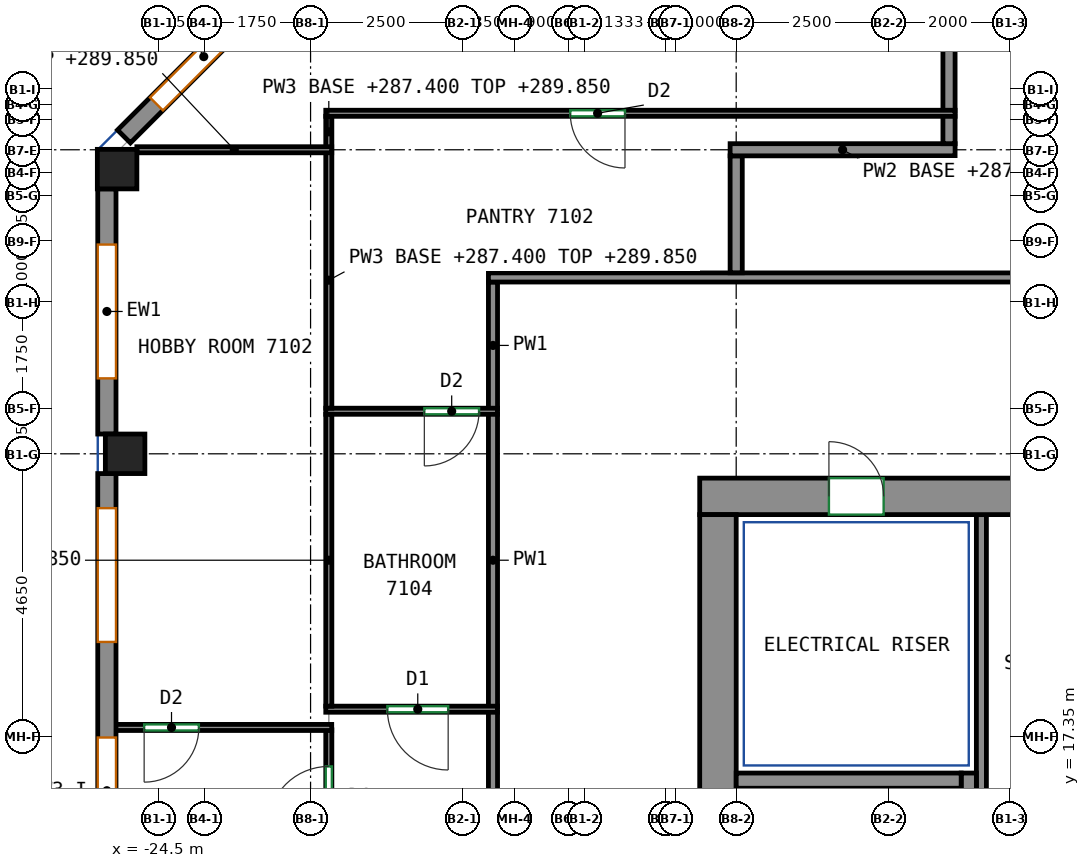
"""IFC4 building model, lengths in metres.
Left out: names, types, materials, properties, quantities, classifications, styles, units other than length and angle.
Written with IfcOpenShell. Run it as: python <this file> out.ifc"""

import sys

from ifc_helpers import new_model, si_unit, direction, frame, frame_2d, origin, origin_2d, place, context, subcontext, project, spatial, rectangle, extrude, source, transform, mapped, element, fill, save


model = new_model("IFC4")
c1 = context("Model", 3, precision=1e-05, world=origin(), true_north=direction((0.0, 1.0)))
c2 = subcontext(c1, "Body", "Model", "MODEL_VIEW")
j1 = project(units=[si_unit("LENGTHUNIT", "METRE"), si_unit("PLANEANGLEUNIT", "RADIAN")], contexts=[c1])
p1 = place(None, origin())
s1 = spatial("IfcSite", under=j1, at=p1, CompositionType="ELEMENT")
p2 = place(p1, origin())
s2 = spatial("IfcBuilding", under=s1, at=p2, CompositionType="ELEMENT")
p3 = place(p2, frame((0.0, 0.0, 287.4)))
s3 = spatial("IfcBuildingStorey", under=s2, at=p3, CompositionType="ELEMENT", Elevation=287.4)
m1 = source(origin(), c2, "Body", "SweptSolid", [
    extrude(rectangle(XDim=0.65, YDim=0.65, at=origin_2d()), origin(), (0.0, 0.0, 1.0), 3.0),
])
for number, where, z_axis, x_axis in (
    (1, (-25.182, 26.682, 0.0), (0.0, 0.0, 1.0), (1.0, 0.0, 0.0)),
    (2, (-25.05, 22.0, 0.0), (0.0, 0.0, 1.0), (1.0, 0.0, 0.0)),
):
    element("IfcColumn", number, at=place(p3, frame(where, z_axis=z_axis, x_axis=x_axis)), inside=s3, PredefinedType="COLUMN", context=c2, shape_type="MappedRepresentation", body=[
        mapped(m1, transform((0.0, 0.0, 0.0))),
    ])
m2 = source(origin(), c2, "Body", "SweptSolid", [
    extrude(rectangle(XDim=33.3, YDim=0.6, at=frame_2d((16.65, 0.0))), origin(), (0.0, 0.0, 1.0), 3.0),
])
p4 = place(p3, frame((-15.6, 21.3, 0.0), z_axis=(0.0, 0.0, 1.0), x_axis=(1.0, 0.0, 0.0)))
e3 = element("IfcWall", 3, at=p4, inside=s3, PredefinedType="SHEAR", context=c2, shape_type="MappedRepresentation", body=[
    mapped(m2, transform((0.0, 0.0, 0.0))),
])
p5 = place(p4, frame((5.708, 0.0, 0.0)))
e4 = element("IfcOpeningElement", 4, at=p5, cuts=e3, PredefinedType="OPENING", context=c2, shape_type="SweptSolid", body=[
    extrude(rectangle(XDim=0.9, YDim=2.1, at=frame_2d((0.45, 1.05))), frame((0.0, 0.31, 0.0), z_axis=(0.0, -1.0, 0.0), x_axis=(1.0, 0.0, 0.0)), (0.0, 0.0, 1.0), 0.62),
])
p6 = place(p4, frame((10.773, 0.0, 0.0)))
e5 = element("IfcOpeningElement", 5, at=p6, cuts=e3, PredefinedType="OPENING", context=c2, shape_type="SweptSolid", body=[
    extrude(rectangle(XDim=0.9, YDim=2.1, at=frame_2d((0.45, 1.05))), frame((0.0, 0.31, 0.0), z_axis=(0.0, -1.0, 0.0), x_axis=(1.0, 0.0, 0.0)), (0.0, 0.0, 1.0), 0.62),
])
p7 = place(p4, frame((15.838, 0.0, 0.0)))
e6 = element("IfcOpeningElement", 6, at=p7, cuts=e3, PredefinedType="OPENING", context=c2, shape_type="SweptSolid", body=[
    extrude(rectangle(XDim=0.9, YDim=2.1, at=frame_2d((0.45, 1.05))), frame((0.0, 0.31, 0.0), z_axis=(0.0, -1.0, 0.0), x_axis=(1.0, 0.0, 0.0)), (0.0, 0.0, 1.0), 0.62),
])
p8 = place(p4, frame((21.493, 0.0, 0.0)))
e7 = element("IfcOpeningElement", 7, at=p8, cuts=e3, PredefinedType="OPENING", context=c2, shape_type="SweptSolid", body=[
    extrude(rectangle(XDim=0.9, YDim=2.1, at=frame_2d((0.45, 1.05))), frame((0.0, 0.31, 0.0), z_axis=(0.0, -1.0, 0.0), x_axis=(1.0, 0.0, 0.0)), (0.0, 0.0, 1.0), 0.62),
])
p9 = place(p4, frame((26.92, 0.0, 0.0)))
e8 = element("IfcOpeningElement", 8, at=p9, cuts=e3, PredefinedType="OPENING", context=c2, shape_type="SweptSolid", body=[
    extrude(rectangle(XDim=0.9, YDim=2.1, at=frame_2d((0.45, 1.05))), frame((0.0, 0.31, 0.0), z_axis=(0.0, -1.0, 0.0), x_axis=(1.0, 0.0, 0.0)), (0.0, 0.0, 1.0), 0.62),
])
p10 = place(p4, frame((2.125, 0.0, 0.0)))
e9 = element("IfcOpeningElement", 9, at=p10, cuts=e3, PredefinedType="OPENING", context=c2, shape_type="SweptSolid", body=[
    extrude(rectangle(XDim=0.9, YDim=2.1, at=frame_2d((0.45, 1.05))), frame((0.0, 0.31, 0.0), z_axis=(0.0, -1.0, 0.0), x_axis=(1.0, 0.0, 0.0)), (0.0, 0.0, 1.0), 0.62),
])
p11 = place(p4, frame((30.275, 0.0, 0.0)))
e10 = element("IfcOpeningElement", 10, at=p11, cuts=e3, PredefinedType="OPENING", context=c2, shape_type="SweptSolid", body=[
    extrude(rectangle(XDim=0.9, YDim=2.1, at=frame_2d((0.45, 1.05))), frame((0.0, 0.31, 0.0), z_axis=(0.0, -1.0, 0.0), x_axis=(1.0, 0.0, 0.0)), (0.0, 0.0, 1.0), 0.62),
])
m3 = source(origin(), c2, "Body", "SweptSolid", [
    extrude(rectangle(XDim=12.0, YDim=0.6, at=frame_2d((6.0, 0.0))), origin(), (0.0, 0.0, 1.0), 3.0),
])
p12 = place(p3, frame((-15.3, 9.0, 0.0), z_axis=(0.0, 0.0, 1.0), x_axis=(0.0, 1.0, 0.0)))
e11 = element("IfcWall", 11, at=p12, inside=s3, PredefinedType="SHEAR", context=c2, shape_type="MappedRepresentation", body=[
    mapped(m3, transform((0.0, 0.0, 0.0))),
])
m4 = source(origin(), c2, "Body", "SweptSolid", [
    extrude(rectangle(XDim=7.75, YDim=0.25, at=frame_2d((3.875, 0.0))), origin(), (0.0, 0.0, 1.0), 3.0),
])
p13 = place(p3, frame((-11.175, 9.0, 0.0), z_axis=(0.0, 0.0, 1.0), x_axis=(0.0, 1.0, 0.0)))
e12 = element("IfcWall", 12, at=p13, inside=s3, PredefinedType="SHEAR", context=c2, shape_type="MappedRepresentation", body=[
    mapped(m4, transform((0.0, 0.0, 0.0))),
])
m5 = source(origin(), c2, "Body", "SweptSolid", [
    extrude(rectangle(XDim=3.7, YDim=0.25, at=frame_2d((1.85, 0.0))), origin(), (0.0, 0.0, 1.0), 3.0),
])
p14 = place(p3, frame((-15.0, 16.625, 0.0), z_axis=(0.0, 0.0, 1.0), x_axis=(1.0, 0.0, 0.0)))
e13 = element("IfcWall", 13, at=p14, inside=s3, PredefinedType="SHEAR", context=c2, shape_type="MappedRepresentation", body=[
    mapped(m5, transform((0.0, 0.0, 0.0))),
])
m6 = source(origin(), c2, "Body", "SweptSolid", [
    extrude(rectangle(XDim=3.712, YDim=0.3, at=frame_2d((1.856, 0.0))), origin(), (0.0, 0.0, 1.0), 3.0),
])
p15 = place(p3, frame((-22.444, 29.844, 0.0), z_axis=(0.0, 0.0, 1.0), x_axis=(-0.707106781187, -0.707106781187, 0.0)))
e14 = element("IfcWall", 14, at=p15, inside=s3, PredefinedType="SOLIDWALL", context=c2, shape_type="MappedRepresentation", body=[
    mapped(m6, transform((0.0, 0.0, 0.0))),
])
p16 = place(p15, frame((0.756, 0.0, 0.8)))
e15 = element("IfcOpeningElement", 15, at=p16, cuts=e14, PredefinedType="OPENING", context=c2, shape_type="SweptSolid", body=[
    extrude(rectangle(XDim=2.2, YDim=2.05, at=frame_2d((1.1, 1.025))), frame((0.0, 0.16, 0.0), z_axis=(0.0, -1.0, 0.0), x_axis=(1.0, 0.0, 0.0)), (0.0, 0.0, 1.0), 0.32),
])
m7 = source(origin(), c2, "Body", "SweptSolid", [
    extrude(rectangle(XDim=4.032, YDim=0.3, at=frame_2d((2.016, 0.0))), origin(), (0.0, 0.0, 1.0), 3.0),
])
p17 = place(p3, frame((-25.35, 26.357, 0.0), z_axis=(0.0, 0.0, 1.0), x_axis=(0.0, -1.0, 0.0)))
e16 = element("IfcWall", 16, at=p17, inside=s3, PredefinedType="SOLIDWALL", context=c2, shape_type="MappedRepresentation", body=[
    mapped(m7, transform((0.0, 0.0, 0.0))),
])
p18 = place(p17, frame((0.916, 0.0, 0.8)))
e17 = element("IfcOpeningElement", 17, at=p18, cuts=e16, PredefinedType="OPENING", context=c2, shape_type="SweptSolid", body=[
    extrude(rectangle(XDim=2.2, YDim=2.05, at=frame_2d((1.1, 1.025))), frame((0.0, 0.16, 0.0), z_axis=(0.0, -1.0, 0.0), x_axis=(1.0, 0.0, 0.0)), (0.0, 0.0, 1.0), 0.32),
])
m8 = source(origin(), c2, "Body", "SweptSolid", [
    extrude(rectangle(XDim=13.35, YDim=0.3, at=frame_2d((6.675, 0.0))), origin(), (0.0, 0.0, 1.0), 3.0),
])
p19 = place(p3, frame((-25.35, 21.675, 0.0), z_axis=(0.0, 0.0, 1.0), x_axis=(0.0, -1.0, 0.0)))
e18 = element("IfcWall", 18, at=p19, inside=s3, PredefinedType="SOLIDWALL", context=c2, shape_type="MappedRepresentation", body=[
    mapped(m8, transform((0.0, 0.0, 0.0))),
])
p20 = place(p19, frame((0.569, 0.0, 0.8)))
e19 = element("IfcOpeningElement", 19, at=p20, cuts=e18, PredefinedType="OPENING", context=c2, shape_type="SweptSolid", body=[
    extrude(rectangle(XDim=2.2, YDim=2.05, at=frame_2d((1.1, 1.025))), frame((0.0, 0.16, 0.0), z_axis=(0.0, -1.0, 0.0), x_axis=(1.0, 0.0, 0.0)), (0.0, 0.0, 1.0), 0.32),
])
p21 = place(p19, frame((4.341, 0.0, 0.8)))
e20 = element("IfcOpeningElement", 20, at=p21, cuts=e18, PredefinedType="OPENING", context=c2, shape_type="SweptSolid", body=[
    extrude(rectangle(XDim=1.75, YDim=2.05, at=frame_2d((0.875, 1.025))), frame((0.0, 0.16, 0.0), z_axis=(0.0, -1.0, 0.0), x_axis=(1.0, 0.0, 0.0)), (0.0, 0.0, 1.0), 0.32),
])
p22 = place(p19, frame((7.244, 0.0, 0.8)))
e21 = element("IfcOpeningElement", 21, at=p22, cuts=e18, PredefinedType="OPENING", context=c2, shape_type="SweptSolid", body=[
    extrude(rectangle(XDim=2.2, YDim=2.05, at=frame_2d((1.1, 1.025))), frame((0.0, 0.16, 0.0), z_axis=(0.0, -1.0, 0.0), x_axis=(1.0, 0.0, 0.0)), (0.0, 0.0, 1.0), 0.32),
])
p23 = place(p19, frame((10.581, 0.0, 0.8)))
e22 = element("IfcOpeningElement", 22, at=p23, cuts=e18, PredefinedType="OPENING", context=c2, shape_type="SweptSolid", body=[
    extrude(rectangle(XDim=2.2, YDim=2.05, at=frame_2d((1.1, 1.025))), frame((0.0, 0.16, 0.0), z_axis=(0.0, -1.0, 0.0), x_axis=(1.0, 0.0, 0.0)), (0.0, 0.0, 1.0), 0.32),
])
m9 = source(origin(), c2, "Body", "SweptSolid", [
    extrude(rectangle(XDim=4.8, YDim=0.165, at=frame_2d((2.4, 0.0))), origin(), (0.0, 0.0, 1.0), 3.0),
])
p24 = place(p3, frame((-10.968, 16.2, 0.0), z_axis=(0.0, 0.0, 1.0), x_axis=(0.0, 1.0, 0.0)))
e23 = element("IfcWall", 23, at=p24, inside=s3, PredefinedType="PARTITIONING", context=c2, shape_type="MappedRepresentation", body=[
    mapped(m9, transform((0.0, 0.0, 0.0))),
])
p25 = place(p3, frame((-19.0, 12.94, 0.0), z_axis=(0.0, 0.0, 1.0), x_axis=(0.0, 1.0, 0.0)))
e24 = element("IfcWall", 24, at=p25, inside=s3, PredefinedType="PARTITIONING", context=c2, shape_type="SweptSolid", body=[
    extrude(rectangle(XDim=4.82, YDim=0.15, at=frame_2d((2.41, 0.0))), origin(), (0.0, 0.0, 1.0), 3.0),
])
p26 = place(p25, frame((1.407, 0.0, 0.0)))
e25 = element("IfcOpeningElement", 25, at=p26, cuts=e24, PredefinedType="OPENING", context=c2, shape_type="SweptSolid", body=[
    extrude(rectangle(XDim=1.0, YDim=2.1, at=frame_2d((0.5, 1.05))), frame((0.0, 0.085, 0.0), z_axis=(0.0, -1.0, 0.0), x_axis=(1.0, 0.0, 0.0)), (0.0, 0.0, 1.0), 0.17),
])
p27 = place(p3, frame((-19.0, 17.84, 0.0), z_axis=(0.0, 0.0, 1.0), x_axis=(0.0, 1.0, 0.0)))
e26 = element("IfcWall", 26, at=p27, inside=s3, PredefinedType="PARTITIONING", context=c2, shape_type="SweptSolid", body=[
    extrude(rectangle(XDim=4.82, YDim=0.15, at=frame_2d((2.41, 0.0))), origin(), (0.0, 0.0, 1.0), 3.0),
])
p28 = place(p3, frame((-19.0, 22.74, 0.0), z_axis=(0.0, 0.0, 1.0), x_axis=(0.0, 1.0, 0.0)))
e27 = element("IfcWall", 27, at=p28, inside=s3, PredefinedType="PARTITIONING", context=c2, shape_type="SweptSolid", body=[
    extrude(rectangle(XDim=2.085, YDim=0.15, at=frame_2d((1.042, 0.0))), origin(), (0.0, 0.0, 1.0), 3.0),
])
p29 = place(p3, frame((-19.075, 24.9, 0.0), z_axis=(0.0, 0.0, 1.0), x_axis=(1.0, 0.0, 0.0)))
e28 = element("IfcWall", 28, at=p29, inside=s3, PredefinedType="PARTITIONING", context=c2, shape_type="SweptSolid", body=[
    extrude(rectangle(XDim=39.75, YDim=0.15, at=frame_2d((19.875, 0.0))), origin(), (0.0, 0.0, 1.0), 3.0),
])
p30 = place(p29, frame((10.77, 0.0, 0.0)))
e29 = element("IfcOpeningElement", 29, at=p30, cuts=e28, PredefinedType="OPENING", context=c2, shape_type="SweptSolid", body=[
    extrude(rectangle(XDim=0.9, YDim=2.1, at=frame_2d((0.45, 1.05))), frame((0.0, 0.085, 0.0), z_axis=(0.0, -1.0, 0.0), x_axis=(1.0, 0.0, 0.0)), (0.0, 0.0, 1.0), 0.17),
])
p31 = place(p29, frame((32.395, 0.0, 0.0)))
e30 = element("IfcOpeningElement", 30, at=p31, cuts=e28, PredefinedType="OPENING", context=c2, shape_type="SweptSolid", body=[
    extrude(rectangle(XDim=1.0, YDim=2.1, at=frame_2d((0.5, 1.05))), frame((0.0, 0.085, 0.0), z_axis=(0.0, -1.0, 0.0), x_axis=(1.0, 0.0, 0.0)), (0.0, 0.0, 1.0), 0.17),
])
p32 = place(p3, frame((-15.0, 26.9, 0.0), z_axis=(0.0, 0.0, 1.0), x_axis=(0.0, -1.0, 0.0)))
e31 = element("IfcWall", 31, at=p32, inside=s3, PredefinedType="PARTITIONING", context=c2, shape_type="SweptSolid", body=[
    extrude(rectangle(XDim=1.923, YDim=0.2, at=frame_2d((0.961, 0.0))), origin(), (0.0, 0.0, 1.0), 3.0),
])
p33 = place(p3, frame((-11.4, 27.0, 0.0), z_axis=(0.0, 0.0, 1.0), x_axis=(-1.0, 0.0, 0.0)))
e32 = element("IfcWall", 32, at=p33, inside=s3, PredefinedType="PARTITIONING", context=c2, shape_type="SweptSolid", body=[
    extrude(rectangle(XDim=3.7, YDim=0.2, at=frame_2d((1.85, 0.0))), origin(), (0.0, 0.0, 1.0), 2.45),
])
p34 = place(p3, frame((-11.5, 27.1, 0.0), z_axis=(0.0, 0.0, 1.0), x_axis=(0.0, 1.0, 0.0)))
e33 = element("IfcWall", 33, at=p34, inside=s3, PredefinedType="PARTITIONING", context=c2, shape_type="SweptSolid", body=[
    extrude(rectangle(XDim=0.46, YDim=0.2, at=frame_2d((0.23, 0.0))), origin(), (0.0, 0.0, 1.0), 3.0),
])
p35 = place(p3, frame((-11.5, 27.642, 0.0), z_axis=(0.0, 0.0, 1.0), x_axis=(0.0, 1.0, 0.0)))
e34 = element("IfcWall", 34, at=p35, inside=s3, PredefinedType="PARTITIONING", context=c2, shape_type="SweptSolid", body=[
    extrude(rectangle(XDim=2.608, YDim=0.2, at=frame_2d((1.304, 0.0))), origin(), (0.0, 0.0, 1.0), 3.0),
])
p36 = place(p3, frame((-18.927, 17.8, 0.0), z_axis=(0.0, 0.0, 1.0), x_axis=(-1.0, 0.0, 0.0)))
e35 = element("IfcWall", 35, at=p36, inside=s3, PredefinedType="PARTITIONING", context=c2, shape_type="SweptSolid", body=[
    extrude(rectangle(XDim=2.823, YDim=0.1, at=frame_2d((1.412, 0.0))), origin(), (0.0, 0.0, 1.0), 3.0),
])
p37 = place(p36, frame((0.81, 0.0, 0.0)))
e36 = element("IfcOpeningElement", 36, at=p37, cuts=e35, PredefinedType="OPENING", context=c2, shape_type="SweptSolid", body=[
    extrude(rectangle(XDim=1.0, YDim=2.1, at=frame_2d((0.5, 1.05))), frame((0.0, 0.06, 0.0), z_axis=(0.0, -1.0, 0.0), x_axis=(1.0, 0.0, 0.0)), (0.0, 0.0, 1.0), 0.12),
])
p38 = place(p3, frame((-21.7, 12.95, 0.0), z_axis=(0.0, 0.0, 1.0), x_axis=(0.0, 1.0, 0.0)))
e37 = element("IfcWall", 37, at=p38, inside=s3, PredefinedType="PARTITIONING", context=c2, shape_type="SweptSolid", body=[
    extrude(rectangle(XDim=4.51, YDim=0.1, at=frame_2d((2.255, 0.0))), origin(), (0.0, 0.0, 1.0), 2.45),
])
p39 = place(p38, frame((2.909, 0.0, 0.0)))
e38 = element("IfcOpeningElement", 38, at=p39, cuts=e37, PredefinedType="OPENING", context=c2, shape_type="SweptSolid", body=[
    extrude(rectangle(XDim=1.0, YDim=2.1, at=frame_2d((0.5, 1.05))), frame((0.0, 0.06, 0.0), z_axis=(0.0, -1.0, 0.0), x_axis=(1.0, 0.0, 0.0)), (0.0, 0.0, 1.0), 0.12),
])
p40 = place(p3, frame((-18.927, 22.7, 0.0), z_axis=(0.0, 0.0, 1.0), x_axis=(-1.0, 0.0, 0.0)))
e39 = element("IfcWall", 39, at=p40, inside=s3, PredefinedType="PARTITIONING", context=c2, shape_type="SweptSolid", body=[
    extrude(rectangle(XDim=2.823, YDim=0.1, at=frame_2d((1.412, 0.0))), origin(), (0.0, 0.0, 1.0), 3.0),
])
p41 = place(p40, frame((0.302, 0.0, 0.0)))
e40 = element("IfcOpeningElement", 40, at=p41, cuts=e39, PredefinedType="OPENING", context=c2, shape_type="SweptSolid", body=[
    extrude(rectangle(XDim=0.9, YDim=2.1, at=frame_2d((0.45, 1.05))), frame((0.0, 0.06, 0.0), z_axis=(0.0, -1.0, 0.0), x_axis=(1.0, 0.0, 0.0)), (0.0, 0.0, 1.0), 0.12),
])
p42 = place(p3, frame((-21.7, 17.85, 0.0), z_axis=(0.0, 0.0, 1.0), x_axis=(0.0, 1.0, 0.0)))
e41 = element("IfcWall", 41, at=p42, inside=s3, PredefinedType="PARTITIONING", context=c2, shape_type="SweptSolid", body=[
    extrude(rectangle(XDim=4.8, YDim=0.1, at=frame_2d((2.4, 0.0))), origin(), (0.0, 0.0, 1.0), 2.45),
])
p43 = place(p3, frame((-21.7, 22.75, 0.0), z_axis=(0.0, 0.0, 1.0), x_axis=(0.0, 1.0, 0.0)))
e42 = element("IfcWall", 42, at=p43, inside=s3, PredefinedType="PARTITIONING", context=c2, shape_type="SweptSolid", body=[
    extrude(rectangle(XDim=4.21, YDim=0.1, at=frame_2d((2.105, 0.0))), origin(), (0.0, 0.0, 1.0), 2.45),
])
p44 = place(p3, frame((-21.7, 27.04, 0.0), z_axis=(0.0, 0.0, 1.0), x_axis=(0.0, 1.0, 0.0)))
e43 = element("IfcWall", 43, at=p44, inside=s3, PredefinedType="PARTITIONING", context=c2, shape_type="SweptSolid", body=[
    extrude(rectangle(XDim=0.51, YDim=0.1, at=frame_2d((0.255, 0.0))), origin(), (0.0, 0.0, 1.0), 2.45),
])
p45 = place(p3, frame((-11.4, 27.6, 0.0), z_axis=(0.0, 0.0, 1.0), x_axis=(-1.0, 0.0, 0.0)))
e44 = element("IfcWall", 44, at=p45, inside=s3, PredefinedType="PARTITIONING", context=c2, shape_type="SweptSolid", body=[
    extrude(rectangle(XDim=10.35, YDim=0.1, at=frame_2d((5.175, 0.0))), origin(), (0.0, 0.0, 1.0), 3.0),
])
p46 = place(p45, frame((5.429, 0.0, 0.0)))
e45 = element("IfcOpeningElement", 45, at=p46, cuts=e44, PredefinedType="OPENING", context=c2, shape_type="SweptSolid", body=[
    extrude(rectangle(XDim=0.9, YDim=2.1, at=frame_2d((0.45, 1.05))), frame((0.0, 0.06, 0.0), z_axis=(0.0, -1.0, 0.0), x_axis=(1.0, 0.0, 0.0)), (0.0, 0.0, 1.0), 0.12),
])
p47 = place(p3, frame((-21.652, 17.5, 0.0), z_axis=(0.0, 0.0, 1.0), x_axis=(-1.0, 0.0, 0.0)))
e46 = element("IfcWall", 46, at=p47, inside=s3, PredefinedType="PARTITIONING", context=c2, shape_type="SweptSolid", body=[
    extrude(rectangle(XDim=3.598, YDim=0.1, at=frame_2d((1.799, 0.0))), origin(), (0.0, 0.0, 1.0), 3.0),
])
p48 = place(p47, frame((2.185, 0.0, 0.0)))
e47 = element("IfcOpeningElement", 47, at=p48, cuts=e46, PredefinedType="OPENING", context=c2, shape_type="SweptSolid", body=[
    extrude(rectangle(XDim=0.9, YDim=2.1, at=frame_2d((0.45, 1.05))), frame((0.0, 0.06, 0.0), z_axis=(0.0, -1.0, 0.0), x_axis=(1.0, 0.0, 0.0)), (0.0, 0.0, 1.0), 0.12),
])
p49 = place(p3, frame((-21.652, 27.0, 0.0), z_axis=(0.0, 0.0, 1.0), x_axis=(-1.0, 0.0, 0.0)))
e48 = element("IfcWall", 48, at=p49, inside=s3, PredefinedType="PARTITIONING", context=c2, shape_type="SweptSolid", body=[
    extrude(rectangle(XDim=3.205, YDim=0.1, at=frame_2d((1.603, 0.0))), origin(), (0.0, 0.0, 1.0), 2.45),
])
p50 = place(p16, origin())
e49 = element("IfcWindow", 49, at=p50, inside=s3, PartitioningType="SINGLE_PANEL", PredefinedType="WINDOW", context=c2, shape_type="SweptSolid", body=[
    extrude(rectangle(XDim=2.2, YDim=2.05, at=frame_2d((1.1, 1.025))), frame((0.0, 0.03, 0.0), z_axis=(0.0, -1.0, 0.0), x_axis=(1.0, 0.0, 0.0)), (0.0, 0.0, 1.0), 0.06),
])
fill(e15, e49)
p51 = place(p18, origin())
e50 = element("IfcWindow", 50, at=p51, inside=s3, PartitioningType="SINGLE_PANEL", PredefinedType="WINDOW", context=c2, shape_type="SweptSolid", body=[
    extrude(rectangle(XDim=2.2, YDim=2.05, at=frame_2d((1.1, 1.025))), frame((0.0, 0.03, 0.0), z_axis=(0.0, -1.0, 0.0), x_axis=(1.0, 0.0, 0.0)), (0.0, 0.0, 1.0), 0.06),
])
fill(e17, e50)
p52 = place(p20, origin())
e51 = element("IfcWindow", 51, at=p52, inside=s3, PartitioningType="SINGLE_PANEL", PredefinedType="WINDOW", context=c2, shape_type="SweptSolid", body=[
    extrude(rectangle(XDim=2.2, YDim=2.05, at=frame_2d((1.1, 1.025))), frame((0.0, 0.03, 0.0), z_axis=(0.0, -1.0, 0.0), x_axis=(1.0, 0.0, 0.0)), (0.0, 0.0, 1.0), 0.06),
])
fill(e19, e51)
p53 = place(p21, origin())
e52 = element("IfcWindow", 52, at=p53, inside=s3, PartitioningType="SINGLE_PANEL", PredefinedType="WINDOW", context=c2, shape_type="SweptSolid", body=[
    extrude(rectangle(XDim=1.75, YDim=2.05, at=frame_2d((0.875, 1.025))), frame((0.0, 0.03, 0.0), z_axis=(0.0, -1.0, 0.0), x_axis=(1.0, 0.0, 0.0)), (0.0, 0.0, 1.0), 0.06),
])
fill(e20, e52)
p54 = place(p10, origin())
e53 = element("IfcDoor", 53, at=p54, inside=s3, OperationType="SINGLE_SWING_LEFT", PredefinedType="DOOR", context=c2, shape_type="SweptSolid", body=[
    extrude(rectangle(XDim=0.9, YDim=2.1, at=frame_2d((0.45, 1.05))), frame((0.0, -0.155, 0.0), z_axis=(0.0, -1.0, 0.0), x_axis=(1.0, 0.0, 0.0)), (0.0, 0.0, 1.0), 0.05),
])
fill(e9, e53)
p55 = place(p39, origin())
e54 = element("IfcDoor", 54, at=p55, inside=s3, OperationType="SINGLE_SWING_LEFT", PredefinedType="DOOR", context=c2, shape_type="SweptSolid", body=[
    extrude(rectangle(XDim=1.0, YDim=2.1, at=frame_2d((0.5, 1.05))), frame((0.0, 0.025, 0.0), z_axis=(0.0, -1.0, 0.0), x_axis=(1.0, 0.0, 0.0)), (0.0, 0.0, 1.0), 0.05),
])
fill(e38, e54)
p56 = place(p48, origin())
e55 = element("IfcDoor", 55, at=p56, inside=s3, OperationType="SINGLE_SWING_RIGHT", PredefinedType="DOOR", context=c2, shape_type="SweptSolid", body=[
    extrude(rectangle(XDim=0.9, YDim=2.1, at=frame_2d((0.45, 1.05))), frame((0.0, 0.025, 0.0), z_axis=(0.0, -1.0, 0.0), x_axis=(1.0, 0.0, 0.0)), (0.0, 0.0, 1.0), 0.05),
])
fill(e47, e55)
p57 = place(p37, origin())
e56 = element("IfcDoor", 56, at=p57, inside=s3, OperationType="SINGLE_SWING_LEFT", PredefinedType="DOOR", context=c2, shape_type="SweptSolid", body=[
    extrude(rectangle(XDim=1.0, YDim=2.1, at=frame_2d((0.5, 1.05))), frame((0.0, 0.025, 0.0), z_axis=(0.0, -1.0, 0.0), x_axis=(1.0, 0.0, 0.0)), (0.0, 0.0, 1.0), 0.05),
])
fill(e36, e56)
p58 = place(p41, origin())
e57 = element("IfcDoor", 57, at=p58, inside=s3, OperationType="SINGLE_SWING_RIGHT", PredefinedType="DOOR", context=c2, shape_type="SweptSolid", body=[
    extrude(rectangle(XDim=0.9, YDim=2.1, at=frame_2d((0.45, 1.05))), frame((0.0, 0.025, 0.0), z_axis=(0.0, -1.0, 0.0), x_axis=(1.0, 0.0, 0.0)), (0.0, 0.0, 1.0), 0.05),
])
fill(e40, e57)
p59 = place(p46, origin())
e58 = element("IfcDoor", 58, at=p59, inside=s3, OperationType="SINGLE_SWING_LEFT", PredefinedType="DOOR", context=c2, shape_type="SweptSolid", body=[
    extrude(rectangle(XDim=0.9, YDim=2.1, at=frame_2d((0.45, 1.05))), frame((0.0, 0.025, 0.0), z_axis=(0.0, -1.0, 0.0), x_axis=(1.0, 0.0, 0.0)), (0.0, 0.0, 1.0), 0.05),
])
fill(e45, e58)
save(model, sys.argv[1])
